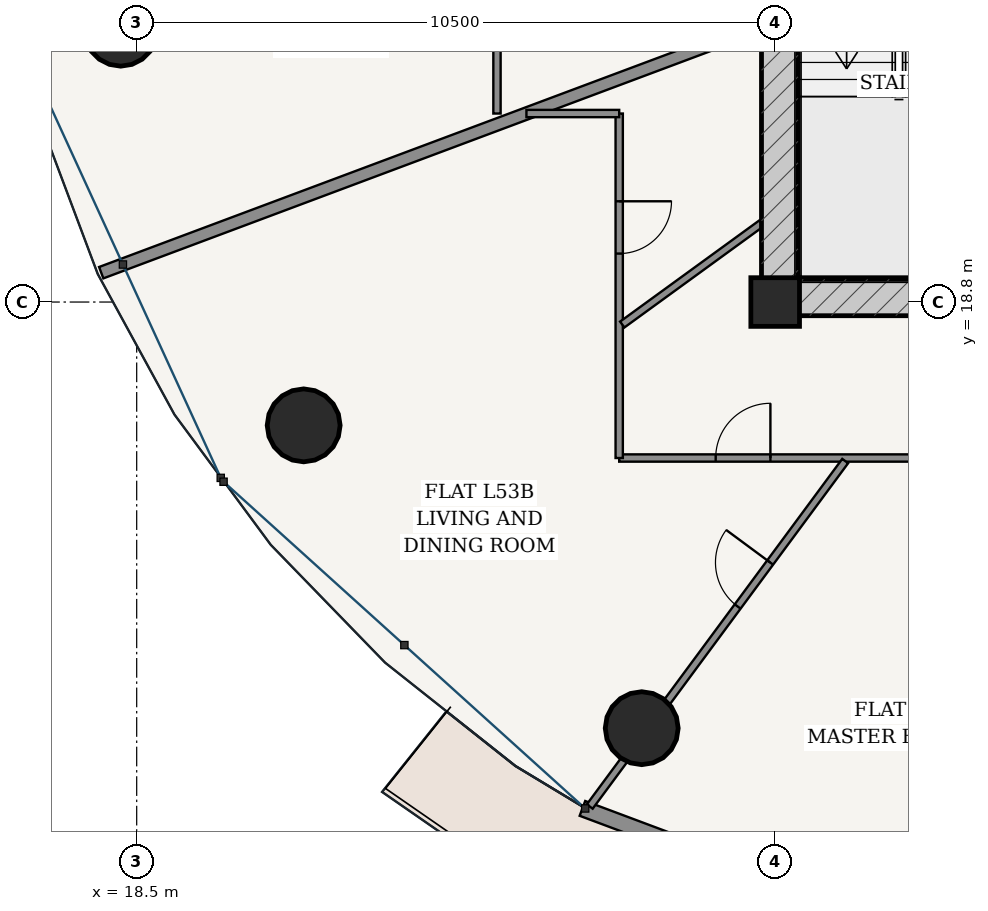
"""IFC4 building model, lengths in metres.
Left out: names, types, materials, properties, quantities, classifications, styles, units other than length and angle.
Written with IfcOpenShell. Run it as: python <this file> out.ifc"""

import sys

from ifc_helpers import new_model, si_unit, direction, frame, frame_2d, origin, origin_2d, place, context, subcontext, project, spatial, rectangle, hollow_circle, extrude, source, transform, mapped, element, fill, save


model = new_model("IFC4")
c1 = context("Model", 3, precision=1e-05, world=origin(), true_north=direction((-0.2419218956, 0.970295726276)))
c2 = subcontext(c1, "Body", "Model", "MODEL_VIEW")
j1 = project(units=[si_unit("LENGTHUNIT", "METRE"), si_unit("PLANEANGLEUNIT", "RADIAN")], contexts=[c1])
p1 = place(None, origin())
s1 = spatial("IfcSite", under=j1, at=p1, CompositionType="ELEMENT")
p2 = place(p1, origin())
s2 = spatial("IfcBuilding", under=s1, at=p2, CompositionType="ELEMENT")
p3 = place(p2, frame((0.0, 0.0, 202.3)))
s3 = spatial("IfcBuildingStorey", under=s2, at=p3, CompositionType="ELEMENT", Elevation=202.3)
p4 = place(p3, frame((29.0, 18.8, 0.0), z_axis=(0.0, 0.0, 1.0), x_axis=(1.0, 0.0, 0.0)))
e1 = element("IfcColumn", 1, at=p4, inside=s3, PredefinedType="COLUMN", context=c2, shape_type="SweptSolid", body=[
    extrude(rectangle(XDim=0.8, YDim=0.8, at=origin_2d()), origin(), (0.0, 0.0, 1.0), 3.7),
])
p5 = place(p3, frame((28.775, 18.875, 0.0), z_axis=(0.0, 0.0, 1.0), x_axis=(1.0, 0.0, 0.0)))
e2 = element("IfcWall", 2, at=p5, inside=s3, PredefinedType="SHEAR", context=c2, shape_type="SweptSolid", body=[
    extrude(rectangle(XDim=18.45, YDim=0.6, at=frame_2d((9.225, 0.0))), origin(), (0.0, 0.0, 1.0), 3.435),
])
p6 = place(p5, frame((6.76, 0.0, 0.0)))
e3 = element("IfcOpeningElement", 3, at=p6, cuts=e2, PredefinedType="OPENING", context=c2, shape_type="SweptSolid", body=[
    extrude(rectangle(XDim=0.85, YDim=2.1, at=frame_2d((0.425, 1.05))), frame((0.0, 0.31, 0.0), z_axis=(0.0, -1.0, 0.0), x_axis=(1.0, 0.0, 0.0)), (0.0, 0.0, 1.0), 0.62),
])
p7 = place(p5, frame((8.8, 0.0, 0.0)))
e4 = element("IfcOpeningElement", 4, at=p7, cuts=e2, PredefinedType="OPENING", context=c2, shape_type="SweptSolid", body=[
    extrude(rectangle(XDim=0.85, YDim=2.1, at=frame_2d((0.425, 1.05))), frame((0.0, 0.31, 0.0), z_axis=(0.0, -1.0, 0.0), x_axis=(1.0, 0.0, 0.0)), (0.0, 0.0, 1.0), 0.62),
])
p8 = place(p5, frame((10.84, 0.0, 0.0)))
e5 = element("IfcOpeningElement", 5, at=p8, cuts=e2, PredefinedType="OPENING", context=c2, shape_type="SweptSolid", body=[
    extrude(rectangle(XDim=0.85, YDim=2.1, at=frame_2d((0.425, 1.05))), frame((0.0, 0.31, 0.0), z_axis=(0.0, -1.0, 0.0), x_axis=(1.0, 0.0, 0.0)), (0.0, 0.0, 1.0), 0.62),
])
p9 = place(p3, frame((29.075, 19.175, 0.0), z_axis=(0.0, 0.0, 1.0), x_axis=(0.0, 1.0, 0.0)))
e6 = element("IfcWall", 6, at=p9, inside=s3, PredefinedType="SHEAR", context=c2, shape_type="SweptSolid", body=[
    extrude(rectangle(XDim=15.25, YDim=0.6, at=frame_2d((7.625, 0.0))), origin(), (0.0, 0.0, 1.0), 3.435),
])
p10 = place(p9, frame((9.875, 0.0, 0.0)))
e7 = element("IfcOpeningElement", 7, at=p10, cuts=e6, PredefinedType="OPENING", context=c2, shape_type="SweptSolid", body=[
    extrude(rectangle(XDim=1.5, YDim=2.2, at=frame_2d((0.75, 1.1))), frame((0.0, 0.31, 0.0), z_axis=(0.0, -1.0, 0.0), x_axis=(1.0, 0.0, 0.0)), (0.0, 0.0, 1.0), 0.62),
])
for number, where, z_axis, x_axis in (
    (8, (18.237, 23.279, 0.0), (0.0, 0.0, 1.0), (1.0, 0.0, 0.0)),
    (9, (21.246, 16.772, 0.0), (0.0, 0.0, 1.0), (1.0, 0.0, 0.0)),
    (10, (26.805, 11.792, 0.0), (0.0, 0.0, 1.0), (1.0, 0.0, 0.0)),
):
    element("IfcColumn", number, at=place(p3, frame(where, z_axis=z_axis, x_axis=x_axis)), inside=s3, PredefinedType="COLUMN", context=c2, shape_type="SweptSolid", body=[
        extrude(hollow_circle(Radius=0.6, WallThickness=0.038, at=origin_2d()), origin(), (0.0, 0.0, 1.0), 3.7),
    ])
p11 = place(p3, frame((25.83, 10.473, 0.0), z_axis=(0.0, 0.0, 1.0), x_axis=(0.936556918375, -0.350515532672, 0.0)))
e11 = element("IfcWall", 11, at=p11, inside=s3, PredefinedType="SOLIDWALL", context=c2, shape_type="SweptSolid", body=[
    extrude(rectangle(XDim=8.539, YDim=0.26, at=frame_2d((4.27, 0.0))), origin(), (0.0, 0.0, 1.0), 3.435),
])
p12 = place(p11, frame((3.594, 0.0, 0.0)))
e12 = element("IfcOpeningElement", 12, at=p12, cuts=e11, PredefinedType="OPENING", context=c2, shape_type="SweptSolid", body=[
    extrude(rectangle(XDim=1.35, YDim=2.2, at=frame_2d((0.675, 1.1))), frame((0.0, 0.14, 0.0), z_axis=(0.0, -1.0, 0.0), x_axis=(1.0, 0.0, 0.0)), (0.0, 0.0, 1.0), 0.28),
])
p13 = place(p3, frame((24.425, 21.9, 0.0), z_axis=(0.0, 0.0, 1.0), x_axis=(0.0, 1.0, 0.0)))
e13 = element("IfcWall", 13, at=p13, inside=s3, PredefinedType="PARTITIONING", context=c2, shape_type="SweptSolid", body=[
    extrude(rectangle(XDim=15.625, YDim=0.12, at=frame_2d((7.812, 0.0))), origin(), (0.0, 0.0, 1.0), 2.951),
])
p14 = place(p13, frame((11.611, 0.0, 0.0)))
e14 = element("IfcOpeningElement", 14, at=p14, cuts=e13, PredefinedType="OPENING", context=c2, shape_type="SweptSolid", body=[
    extrude(rectangle(XDim=0.9, YDim=2.15, at=frame_2d((0.45, 1.075))), frame((0.0, 0.07, 0.0), z_axis=(0.0, -1.0, 0.0), x_axis=(1.0, 0.0, 0.0)), (0.0, 0.0, 1.0), 0.14),
])
p15 = place(p3, frame((28.775, 23.347, 0.0), z_axis=(0.0, 0.0, 1.0), x_axis=(-0.936537569358, -0.350567227761, 0.0)))
e15 = element("IfcWall", 15, at=p15, inside=s3, PredefinedType="PARTITIONING", context=c2, shape_type="SweptSolid", body=[
    extrude(rectangle(XDim=11.594, YDim=0.2, at=frame_2d((5.797, 0.0))), origin(), (0.0, 0.0, 1.0), 2.951),
])
p16 = place(p3, frame((31.9, 16.235, 0.0), z_axis=(0.0, 0.0, 1.0), x_axis=(-1.0, 0.0, 0.0)))
e16 = element("IfcWall", 16, at=p16, inside=s3, PredefinedType="PARTITIONING", context=c2, shape_type="SweptSolid", body=[
    extrude(rectangle(XDim=5.465, YDim=0.12, at=frame_2d((2.732, 0.0))), origin(), (0.0, 0.0, 1.0), 2.951),
])
p17 = place(p16, frame((2.979, 0.0, 0.0)))
e17 = element("IfcOpeningElement", 17, at=p17, cuts=e16, PredefinedType="OPENING", context=c2, shape_type="SweptSolid", body=[
    extrude(rectangle(XDim=0.9, YDim=2.15, at=frame_2d((0.45, 1.075))), frame((0.0, 0.07, 0.0), z_axis=(0.0, -1.0, 0.0), x_axis=(1.0, 0.0, 0.0)), (0.0, 0.0, 1.0), 0.14),
])
p18 = place(p3, frame((26.435, 16.235, 0.0), z_axis=(0.0, 0.0, 1.0), x_axis=(0.0, 1.0, 0.0)))
e18 = element("IfcWall", 18, at=p18, inside=s3, PredefinedType="PARTITIONING", context=c2, shape_type="SweptSolid", body=[
    extrude(rectangle(XDim=5.665, YDim=0.12, at=frame_2d((2.833, 0.0))), origin(), (0.0, 0.0, 1.0), 2.951),
])
p19 = place(p18, frame((3.362, 0.0, 0.0)))
e19 = element("IfcOpeningElement", 19, at=p19, cuts=e18, PredefinedType="OPENING", context=c2, shape_type="SweptSolid", body=[
    extrude(rectangle(XDim=0.86, YDim=2.15, at=frame_2d((0.43, 1.075))), frame((0.0, 0.07, 0.0), z_axis=(0.0, -1.0, 0.0), x_axis=(1.0, 0.0, 0.0)), (0.0, 0.0, 1.0), 0.14),
])
p20 = place(p3, frame((26.435, 21.9, 0.0), z_axis=(0.0, 0.0, 1.0), x_axis=(-1.0, 0.0, 0.0)))
e20 = element("IfcWall", 20, at=p20, inside=s3, PredefinedType="PARTITIONING", context=c2, shape_type="SweptSolid", body=[
    extrude(rectangle(XDim=1.526, YDim=0.12, at=frame_2d((0.763, 0.0))), origin(), (0.0, 0.0, 1.0), 3.435),
])
p21 = place(p3, frame((30.151, 16.185, 0.0), z_axis=(0.0, 0.0, 1.0), x_axis=(-0.594540664599, -0.804065543434, 0.0)))
e21 = element("IfcWall", 21, at=p21, inside=s3, PredefinedType="PARTITIONING", context=c2, shape_type="SweptSolid", body=[
    extrude(rectangle(XDim=7.066, YDim=0.12, at=frame_2d((3.533, 0.0))), origin(), (0.0, 0.0, 1.0), 2.951),
])
p22 = place(p21, frame((2.075, 0.0, 0.0)))
e22 = element("IfcOpeningElement", 22, at=p22, cuts=e21, PredefinedType="OPENING", context=c2, shape_type="SweptSolid", body=[
    extrude(rectangle(XDim=0.9, YDim=2.15, at=frame_2d((0.45, 1.075))), frame((0.0, 0.07, 0.0), z_axis=(0.0, -1.0, 0.0), x_axis=(1.0, 0.0, 0.0)), (0.0, 0.0, 1.0), 0.14),
])
p23 = place(p3, frame((28.775, 20.094, 0.0), z_axis=(0.0, 0.0, 1.0), x_axis=(-0.808862864425, -0.587997335499, 0.0)))
e23 = element("IfcWall", 23, at=p23, inside=s3, PredefinedType="PARTITIONING", context=c2, shape_type="SweptSolid", body=[
    extrude(rectangle(XDim=2.831, YDim=0.12, at=frame_2d((1.416, 0.0))), origin(), (0.0, 0.0, 1.0), 3.435),
])
m1 = source(origin(), c2, "Body", "SweptSolid", [
    extrude(rectangle(XDim=0.9, YDim=2.15, at=frame_2d((0.45, 1.075))), frame((0.0, 0.025, 0.0), z_axis=(0.0, -1.0, 0.0), x_axis=(1.0, 0.0, 0.0)), (0.0, 0.0, 1.0), 0.05),
])
p24 = place(p22, frame((0.9, 0.0, 0.0), z_axis=(0.0, 0.0, 1.0), x_axis=(-1.0, 0.0, 0.0)))
e24 = element("IfcDoor", 24, at=p24, inside=s3, OperationType="SINGLE_SWING_RIGHT", PredefinedType="DOOR", context=c2, shape_type="MappedRepresentation", body=[
    mapped(m1, transform((0.0, 0.0, 0.0), scale=1.0)),
])
fill(e22, e24)
m2 = source(origin(), c2, "Body", "SweptSolid", [
    extrude(rectangle(XDim=0.86, YDim=2.15, at=frame_2d((0.43, 1.075))), frame((0.0, 0.025, 0.0), z_axis=(0.0, -1.0, 0.0), x_axis=(1.0, 0.0, 0.0)), (0.0, 0.0, 1.0), 0.05),
])
p25 = place(p19, frame((0.86, 0.0, 0.0), z_axis=(0.0, 0.0, 1.0), x_axis=(-1.0, 0.0, 0.0)))
e25 = element("IfcDoor", 25, at=p25, inside=s3, OperationType="SINGLE_SWING_LEFT", PredefinedType="DOOR", context=c2, shape_type="MappedRepresentation", body=[
    mapped(m2, transform((0.0, 0.0, 0.0), scale=1.0)),
])
fill(e19, e25)
p26 = place(p17, frame((0.9, 0.0, 0.0), z_axis=(0.0, 0.0, 1.0), x_axis=(-1.0, 0.0, 0.0)))
e26 = element("IfcDoor", 26, at=p26, inside=s3, OperationType="SINGLE_SWING_RIGHT", PredefinedType="DOOR", context=c2, shape_type="MappedRepresentation", body=[
    mapped(m1, transform((0.0, 0.0, 0.0), scale=1.0)),
])
fill(e17, e26)
save(model, sys.argv[1])
